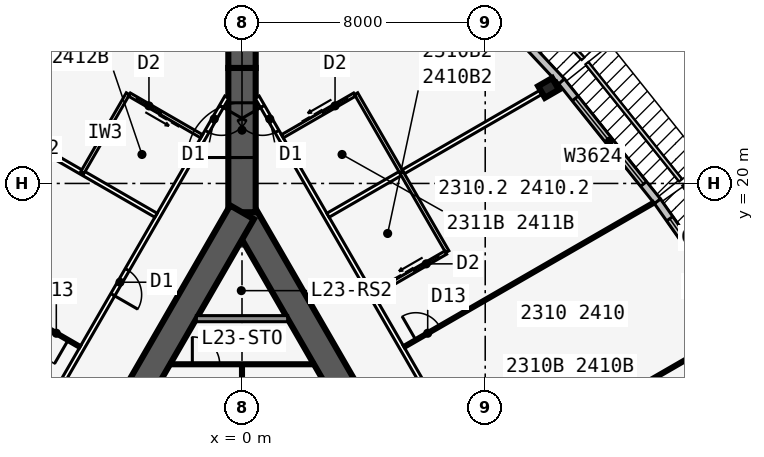
"""IFC4 building model, lengths in metres.
Left out: names, types, materials, properties, quantities, classifications, styles, units other than length and angle.
Written with IfcOpenShell. Run it as: python <this file> out.ifc"""

import sys

from ifc_helpers import new_model, si_unit, direction, frame, frame_2d, origin, origin_2d, place, context, subcontext, project, spatial, rectangle, i_section, extrude, element, fill, save


model = new_model("IFC4")
c1 = context("Model", 3, precision=1e-05, world=origin(), true_north=direction((0.0, 1.0)))
c2 = subcontext(c1, "Body", "Model", "MODEL_VIEW")
j1 = project(units=[si_unit("LENGTHUNIT", "METRE"), si_unit("PLANEANGLEUNIT", "RADIAN")], contexts=[c1])
p1 = place(None, origin())
s1 = spatial("IfcSite", under=j1, at=p1, CompositionType="ELEMENT")
p2 = place(p1, origin())
s2 = spatial("IfcBuilding", under=s1, at=p2, CompositionType="ELEMENT")
p3 = place(p2, frame((0.0, 0.0, 89.7)))
s3 = spatial("IfcBuildingStorey", under=s2, at=p3, CompositionType="ELEMENT", Elevation=89.7)
p4 = place(p3, frame((16.5, -9.526, 0.0), z_axis=(0.0, 0.0, 1.0), x_axis=(-0.499999749417, 0.866025548458, 0.0)))
e1 = element("IfcWall", 1, at=p4, inside=s3, PredefinedType="SHEAR", context=c2, shape_type="SweptSolid", body=[
    extrude(rectangle(XDim=33.0, YDim=0.9, at=frame_2d((16.5, 0.0))), origin(), (0.0, 0.0, 1.0), 3.4),
])
p5 = place(p4, frame((14.15, 0.0, 0.0)))
e2 = element("IfcOpeningElement", 2, at=p5, cuts=e1, PredefinedType="OPENING", context=c2, shape_type="SweptSolid", body=[
    extrude(rectangle(XDim=1.8, YDim=2.13, at=frame_2d((0.9, 1.065))), frame((0.0, 0.46, 0.0), z_axis=(0.0, -1.0, 0.0), x_axis=(1.0, 0.0, 0.0)), (0.0, 0.0, 1.0), 0.92),
])
p6 = place(p4, frame((12.6, 0.0, 0.0)))
e3 = element("IfcOpeningElement", 3, at=p6, cuts=e1, PredefinedType="OPENING", context=c2, shape_type="SweptSolid", body=[
    extrude(rectangle(XDim=1.0, YDim=2.13, at=frame_2d((0.5, 1.065))), frame((0.0, 0.46, 0.0), z_axis=(0.0, -1.0, 0.0), x_axis=(1.0, 0.0, 0.0)), (0.0, 0.0, 1.0), 0.92),
])
p7 = place(p3, frame((0.0, 19.052, 0.0), z_axis=(0.0, 0.0, 1.0), x_axis=(-0.499999749417, -0.866025548458, 0.0)))
e4 = element("IfcWall", 4, at=p7, inside=s3, PredefinedType="SHEAR", context=c2, shape_type="SweptSolid", body=[
    extrude(rectangle(XDim=33.0, YDim=0.9, at=frame_2d((16.5, 0.0))), origin(), (0.0, 0.0, 1.0), 3.4),
])
p8 = place(p7, frame((14.15, 0.0, 0.0)))
e5 = element("IfcOpeningElement", 5, at=p8, cuts=e4, PredefinedType="OPENING", context=c2, shape_type="SweptSolid", body=[
    extrude(rectangle(XDim=1.8, YDim=2.13, at=frame_2d((0.9, 1.065))), frame((0.0, 0.46, 0.0), z_axis=(0.0, -1.0, 0.0), x_axis=(1.0, 0.0, 0.0)), (0.0, 0.0, 1.0), 0.92),
])
p9 = place(p7, frame((12.6, 0.0, 0.0)))
e6 = element("IfcOpeningElement", 6, at=p9, cuts=e4, PredefinedType="OPENING", context=c2, shape_type="SweptSolid", body=[
    extrude(rectangle(XDim=1.0, YDim=2.13, at=frame_2d((0.5, 1.065))), frame((0.0, 0.46, 0.0), z_axis=(0.0, -1.0, 0.0), x_axis=(1.0, 0.0, 0.0)), (0.0, 0.0, 1.0), 0.92),
])
p10 = place(p3, frame((0.0, 19.052, 0.0), z_axis=(0.0, 0.0, 1.0), x_axis=(0.0, 1.0, 0.0)))
e7 = element("IfcWall", 7, at=p10, inside=s3, PredefinedType="SHEAR", context=c2, shape_type="SweptSolid", body=[
    extrude(rectangle(XDim=4.746, YDim=0.9, at=frame_2d((2.373, 0.0))), origin(), (0.0, 0.0, 1.0), 3.4),
])
p11 = place(p10, frame((1.8, 0.0, 0.0)))
e8 = element("IfcOpeningElement", 8, at=p11, cuts=e7, PredefinedType="OPENING", context=c2, shape_type="SweptSolid", body=[
    extrude(rectangle(XDim=1.8, YDim=2.13, at=frame_2d((0.9, 1.065))), frame((0.0, 0.46, 0.0), z_axis=(0.0, -1.0, 0.0), x_axis=(1.0, 0.0, 0.0)), (0.0, 0.0, 1.0), 0.92),
])
p12 = place(p3, frame((0.0, 23.799, 0.0), z_axis=(0.0, 0.0, 1.0), x_axis=(0.0, 1.0, 0.0)))
e9 = element("IfcWall", 9, at=p12, inside=s3, PredefinedType="SHEAR", context=c2, shape_type="SweptSolid", body=[
    extrude(rectangle(XDim=1.155, YDim=0.9, at=frame_2d((0.577, 0.0))), origin(), (0.0, 0.0, 1.0), 3.4),
])
p13 = place(p3, frame((10.083, 23.142, 0.0), z_axis=(0.0, 0.0, 1.0), x_axis=(-0.5, 0.866025403784, 0.0)))
e10 = element("IfcColumn", 10, at=p13, inside=s3, PredefinedType="COLUMN", context=c2, shape_type="SweptSolid", body=[
    extrude(i_section(OverallWidth=0.442, OverallDepth=0.531, WebThickness=0.066, FlangeThickness=0.106, at=origin_2d()), origin(), (0.0, 0.0, 1.0), 3.4),
])
p14 = place(p3, frame((16.555, 15.318, 0.0), z_axis=(0.0, 0.0, 1.0), x_axis=(-0.5766431066, 0.81699616132, 0.0)))
e11 = element("IfcWall", 11, at=p14, inside=s3, PredefinedType="STANDARD", context=c2, shape_type="SweptSolid", body=[
    extrude(rectangle(XDim=5.021, YDim=0.25, at=frame_2d((2.51, 0.0))), origin(), (0.0, 0.0, 1.0), 3.235),
])
p15 = place(p14, frame((0.71, 0.0, 0.45)))
e12 = element("IfcOpeningElement", 12, at=p15, cuts=e11, PredefinedType="OPENING", context=c2, shape_type="SweptSolid", body=[
    extrude(rectangle(XDim=3.6, YDim=2.4, at=frame_2d((1.8, 1.2))), frame((0.0, 0.135, 0.0), z_axis=(0.0, -1.0, 0.0), x_axis=(1.0, 0.0, 0.0)), (0.0, 0.0, 1.0), 0.27),
])
p16 = place(p3, frame((13.664, 19.414, 0.0), z_axis=(0.0, 0.0, 1.0), x_axis=(-0.624594965756, 0.780948864364, 0.0)))
e13 = element("IfcWall", 13, at=p16, inside=s3, PredefinedType="STANDARD", context=c2, shape_type="SweptSolid", body=[
    extrude(rectangle(XDim=5.058, YDim=0.25, at=frame_2d((2.529, 0.0))), origin(), (0.0, 0.0, 1.0), 3.235),
])
p17 = place(p16, frame((0.729, 0.0, 0.45)))
e14 = element("IfcOpeningElement", 14, at=p17, cuts=e13, PredefinedType="OPENING", context=c2, shape_type="SweptSolid", body=[
    extrude(rectangle(XDim=3.6, YDim=2.4, at=frame_2d((1.8, 1.2))), frame((0.0, 0.135, 0.0), z_axis=(0.0, -1.0, 0.0), x_axis=(1.0, 0.0, 0.0)), (0.0, 0.0, 1.0), 0.27),
])
p18 = place(p3, frame((10.511, 23.357, 0.0), z_axis=(0.0, 0.0, 1.0), x_axis=(-0.682289646561, 0.731081964075, 0.0)))
e15 = element("IfcWall", 15, at=p18, inside=s3, PredefinedType="STANDARD", context=c2, shape_type="SweptSolid", body=[
    extrude(rectangle(XDim=8.211, YDim=0.25, at=frame_2d((4.105, 0.0))), origin(), (0.0, 0.0, 1.0), 3.235),
])
p19 = place(p18, frame((2.006, 0.0, 0.45)))
e16 = element("IfcOpeningElement", 16, at=p19, cuts=e15, PredefinedType="OPENING", context=c2, shape_type="SweptSolid", body=[
    extrude(rectangle(XDim=4.2, YDim=2.4, at=frame_2d((2.1, 1.2))), frame((0.0, 0.135, 0.0), z_axis=(0.0, -1.0, 0.0), x_axis=(1.0, 0.0, 0.0)), (0.0, 0.0, 1.0), 0.27),
])
p20 = place(p3, frame((-4.909, 29.36, 0.0), z_axis=(0.0, 0.0, 1.0), x_axis=(-0.682289646561, -0.731081964075, 0.0)))
e17 = element("IfcWall", 17, at=p20, inside=s3, PredefinedType="STANDARD", context=c2, shape_type="SweptSolid", body=[
    extrude(rectangle(XDim=8.211, YDim=0.25, at=frame_2d((4.105, 0.0))), origin(), (0.0, 0.0, 1.0), 3.235),
])
p21 = place(p20, frame((2.006, 0.0, 0.45)))
e18 = element("IfcOpeningElement", 18, at=p21, cuts=e17, PredefinedType="OPENING", context=c2, shape_type="SweptSolid", body=[
    extrude(rectangle(XDim=4.2, YDim=2.4, at=frame_2d((2.1, 1.2))), frame((0.0, 0.135, 0.0), z_axis=(0.0, -1.0, 0.0), x_axis=(1.0, 0.0, 0.0)), (0.0, 0.0, 1.0), 0.27),
])
p22 = place(p3, frame((20.027, -10.985, 0.0), z_axis=(0.0, 0.0, 1.0), x_axis=(-0.500001677587, 0.866024435227, 0.0)))
e19 = element("IfcWall", 19, at=p22, inside=s3, PredefinedType="PARTITIONING", context=c2, shape_type="SweptSolid", body=[
    extrude(rectangle(XDim=39.054, YDim=0.15, at=frame_2d((19.527, 0.0))), origin(), (0.0, 0.0, 1.0), 3.235),
])
p23 = place(p22, frame((0.352, 0.0, 0.0)))
e20 = element("IfcOpeningElement", 20, at=p23, cuts=e19, PredefinedType="OPENING", context=c2, shape_type="SweptSolid", body=[
    extrude(rectangle(XDim=0.95, YDim=2.13, at=frame_2d((0.475, 1.065))), frame((0.0, 0.085, 0.0), z_axis=(0.0, -1.0, 0.0), x_axis=(1.0, 0.0, 0.0)), (0.0, 0.0, 1.0), 0.17),
])
p24 = place(p22, frame((10.352, 0.0, 0.0)))
e21 = element("IfcOpeningElement", 21, at=p24, cuts=e19, PredefinedType="OPENING", context=c2, shape_type="SweptSolid", body=[
    extrude(rectangle(XDim=0.95, YDim=2.13, at=frame_2d((0.475, 1.065))), frame((0.0, 0.085, 0.0), z_axis=(0.0, -1.0, 0.0), x_axis=(1.0, 0.0, 0.0)), (0.0, 0.0, 1.0), 0.17),
])
p25 = place(p22, frame((17.752, 0.0, 0.0)))
e22 = element("IfcOpeningElement", 22, at=p25, cuts=e19, PredefinedType="OPENING", context=c2, shape_type="SweptSolid", body=[
    extrude(rectangle(XDim=0.95, YDim=2.13, at=frame_2d((0.475, 1.065))), frame((0.0, 0.085, 0.0), z_axis=(0.0, -1.0, 0.0), x_axis=(1.0, 0.0, 0.0)), (0.0, 0.0, 1.0), 0.17),
])
p26 = place(p22, frame((26.552, 0.0, 0.0)))
e23 = element("IfcOpeningElement", 23, at=p26, cuts=e19, PredefinedType="OPENING", context=c2, shape_type="SweptSolid", body=[
    extrude(rectangle(XDim=0.95, YDim=2.13, at=frame_2d((0.475, 1.065))), frame((0.0, 0.085, 0.0), z_axis=(0.0, -1.0, 0.0), x_axis=(1.0, 0.0, 0.0)), (0.0, 0.0, 1.0), 0.17),
])
p27 = place(p22, frame((37.752, 0.0, 0.0)))
e24 = element("IfcOpeningElement", 24, at=p27, cuts=e19, PredefinedType="OPENING", context=c2, shape_type="SweptSolid", body=[
    extrude(rectangle(XDim=0.95, YDim=2.13, at=frame_2d((0.475, 1.065))), frame((0.0, 0.085, 0.0), z_axis=(0.0, -1.0, 0.0), x_axis=(1.0, 0.0, 0.0)), (0.0, 0.0, 1.0), 0.17),
])
p28 = place(p3, frame((7.829, 10.293, 0.0), z_axis=(0.0, 0.0, 1.0), x_axis=(0.866016302457, 0.50001576363, 0.0)))
e25 = element("IfcWall", 25, at=p28, inside=s3, PredefinedType="PARTITIONING", context=c2, shape_type="SweptSolid", body=[
    extrude(rectangle(XDim=9.943, YDim=0.1, at=frame_2d((4.972, 0.0))), origin(), (0.0, 0.0, 1.0), 2.389),
])
p29 = place(p28, frame((0.45, 0.0, 0.0)))
e26 = element("IfcOpeningElement", 26, at=p29, cuts=e25, PredefinedType="OPENING", context=c2, shape_type="SweptSolid", body=[
    extrude(rectangle(XDim=0.9, YDim=2.13, at=frame_2d((0.45, 1.065))), frame((0.0, 0.06, 0.0), z_axis=(0.0, -1.0, 0.0), x_axis=(1.0, 0.0, 0.0)), (0.0, 0.0, 1.0), 0.12),
])
p30 = place(p3, frame((5.329, 14.623, 0.0), z_axis=(0.0, 0.0, 1.0), x_axis=(0.866018409083, 0.500012114982, 0.0)))
e27 = element("IfcWall", 27, at=p30, inside=s3, PredefinedType="PARTITIONING", context=c2, shape_type="SweptSolid", body=[
    extrude(rectangle(XDim=9.485, YDim=0.1, at=frame_2d((4.742, 0.0))), origin(), (0.0, 0.0, 1.0), 2.389),
])
p31 = place(p30, frame((0.45, 0.0, 0.0)))
e28 = element("IfcOpeningElement", 28, at=p31, cuts=e27, PredefinedType="OPENING", context=c2, shape_type="SweptSolid", body=[
    extrude(rectangle(XDim=0.9, YDim=2.13, at=frame_2d((0.45, 1.065))), frame((0.0, 0.06, 0.0), z_axis=(0.0, -1.0, 0.0), x_axis=(1.0, 0.0, 0.0)), (0.0, 0.0, 1.0), 0.12),
])
p32 = place(p3, frame((2.829, 18.954, 0.0), z_axis=(0.0, 0.0, 1.0), x_axis=(0.866020536561, 0.500008430184, 0.0)))
e29 = element("IfcWall", 29, at=p32, inside=s3, PredefinedType="PARTITIONING", context=c2, shape_type="SweptSolid", body=[
    extrude(rectangle(XDim=8.72, YDim=0.15, at=frame_2d((4.36, 0.0))), origin(), (0.0, 0.0, 1.0), 2.389),
])
p33 = place(p3, frame((6.753, 17.755, 0.0), z_axis=(0.0, 0.0, 1.0), x_axis=(-0.499990139034, 0.866031096941, 0.0)))
e30 = element("IfcWall", 30, at=p33, inside=s3, PredefinedType="PLUMBINGWALL", context=c2, shape_type="SweptSolid", body=[
    extrude(rectangle(XDim=3.0, YDim=0.12, at=frame_2d((1.5, 0.0))), origin(), (0.0, 0.0, 1.0), 3.235),
])
p34 = place(p3, frame((4.329, 16.355, 0.0), z_axis=(0.0, 0.0, 1.0), x_axis=(0.866035715982, 0.499982138324, 0.0)))
e31 = element("IfcWall", 31, at=p34, inside=s3, PredefinedType="PLUMBINGWALL", context=c2, shape_type="SweptSolid", body=[
    extrude(rectangle(XDim=2.74, YDim=0.12, at=frame_2d((1.37, 0.0))), origin(), (0.0, 0.0, 1.0), 3.235),
])
p35 = place(p34, frame((1.55, 0.0, 0.0)))
e32 = element("IfcOpeningElement", 32, at=p35, cuts=e31, PredefinedType="OPENING", context=c2, shape_type="SweptSolid", body=[
    extrude(rectangle(XDim=0.9, YDim=2.13, at=frame_2d((0.45, 1.065))), frame((0.0, 0.07, 0.0), z_axis=(0.0, -1.0, 0.0), x_axis=(1.0, 0.0, 0.0)), (0.0, 0.0, 1.0), 0.14),
])
p36 = place(p3, frame((5.253, 20.354, 0.0), z_axis=(0.0, 0.0, 1.0), x_axis=(-0.499990139034, 0.866031096941, 0.0)))
e33 = element("IfcWall", 33, at=p36, inside=s3, PredefinedType="PLUMBINGWALL", context=c2, shape_type="SweptSolid", body=[
    extrude(rectangle(XDim=3.0, YDim=0.12, at=frame_2d((1.5, 0.0))), origin(), (0.0, 0.0, 1.0), 3.235),
])
p37 = place(p3, frame((1.329, 21.552, 0.0), z_axis=(0.0, 0.0, 1.0), x_axis=(0.865997131366, 0.500048966069, 0.0)))
e34 = element("IfcWall", 34, at=p37, inside=s3, PredefinedType="PLUMBINGWALL", context=c2, shape_type="SweptSolid", body=[
    extrude(rectangle(XDim=2.74, YDim=0.12, at=frame_2d((1.37, 0.0))), origin(), (0.0, 0.0, 1.0), 3.235),
])
p38 = place(p37, frame((1.55, 0.0, 0.0)))
e35 = element("IfcOpeningElement", 35, at=p38, cuts=e34, PredefinedType="OPENING", context=c2, shape_type="SweptSolid", body=[
    extrude(rectangle(XDim=0.9, YDim=2.13, at=frame_2d((0.45, 1.065))), frame((0.0, 0.07, 0.0), z_axis=(0.0, -1.0, 0.0), x_axis=(1.0, 0.0, 0.0)), (0.0, 0.0, 1.0), 0.14),
])
p39 = place(p3, frame((-0.5, 22.836, 0.0), z_axis=(0.0, 0.0, 1.0), x_axis=(-0.500001677587, -0.866024435227, 0.0)))
e36 = element("IfcWall", 36, at=p39, inside=s3, PredefinedType="PARTITIONING", context=c2, shape_type="SweptSolid", body=[
    extrude(rectangle(XDim=39.054, YDim=0.15, at=frame_2d((19.527, 0.0))), origin(), (0.0, 0.0, 1.0), 3.235),
])
p40 = place(p39, frame((0.352, 0.0, 0.0)))
e37 = element("IfcOpeningElement", 37, at=p40, cuts=e36, PredefinedType="OPENING", context=c2, shape_type="SweptSolid", body=[
    extrude(rectangle(XDim=0.95, YDim=2.13, at=frame_2d((0.475, 1.065))), frame((0.0, 0.085, 0.0), z_axis=(0.0, -1.0, 0.0), x_axis=(1.0, 0.0, 0.0)), (0.0, 0.0, 1.0), 0.17),
])
p41 = place(p39, frame((6.552, 0.0, 0.0)))
e38 = element("IfcOpeningElement", 38, at=p41, cuts=e36, PredefinedType="OPENING", context=c2, shape_type="SweptSolid", body=[
    extrude(rectangle(XDim=0.95, YDim=2.13, at=frame_2d((0.475, 1.065))), frame((0.0, 0.085, 0.0), z_axis=(0.0, -1.0, 0.0), x_axis=(1.0, 0.0, 0.0)), (0.0, 0.0, 1.0), 0.17),
])
p42 = place(p39, frame((20.352, 0.0, 0.0)))
e39 = element("IfcOpeningElement", 39, at=p42, cuts=e36, PredefinedType="OPENING", context=c2, shape_type="SweptSolid", body=[
    extrude(rectangle(XDim=0.95, YDim=2.13, at=frame_2d((0.475, 1.065))), frame((0.0, 0.085, 0.0), z_axis=(0.0, -1.0, 0.0), x_axis=(1.0, 0.0, 0.0)), (0.0, 0.0, 1.0), 0.17),
])
p43 = place(p39, frame((27.752, 0.0, 0.0)))
e40 = element("IfcOpeningElement", 40, at=p43, cuts=e36, PredefinedType="OPENING", context=c2, shape_type="SweptSolid", body=[
    extrude(rectangle(XDim=0.95, YDim=2.13, at=frame_2d((0.475, 1.065))), frame((0.0, 0.085, 0.0), z_axis=(0.0, -1.0, 0.0), x_axis=(1.0, 0.0, 0.0)), (0.0, 0.0, 1.0), 0.17),
])
p44 = place(p39, frame((37.752, 0.0, 0.0)))
e41 = element("IfcOpeningElement", 41, at=p44, cuts=e36, PredefinedType="OPENING", context=c2, shape_type="SweptSolid", body=[
    extrude(rectangle(XDim=0.95, YDim=2.13, at=frame_2d((0.475, 1.065))), frame((0.0, 0.085, 0.0), z_axis=(0.0, -1.0, 0.0), x_axis=(1.0, 0.0, 0.0)), (0.0, 0.0, 1.0), 0.17),
])
p45 = place(p3, frame((-2.829, 18.954, 0.0), z_axis=(0.0, 0.0, 1.0), x_axis=(-0.866020536561, 0.500008430184, 0.0)))
e42 = element("IfcWall", 42, at=p45, inside=s3, PredefinedType="PARTITIONING", context=c2, shape_type="SweptSolid", body=[
    extrude(rectangle(XDim=8.72, YDim=0.15, at=frame_2d((4.36, 0.0))), origin(), (0.0, 0.0, 1.0), 2.389),
])
p46 = place(p3, frame((-5.329, 14.623, 0.0), z_axis=(0.0, 0.0, 1.0), x_axis=(-0.866018409083, 0.500012114982, 0.0)))
e43 = element("IfcWall", 43, at=p46, inside=s3, PredefinedType="PARTITIONING", context=c2, shape_type="SweptSolid", body=[
    extrude(rectangle(XDim=9.485, YDim=0.1, at=frame_2d((4.742, 0.0))), origin(), (0.0, 0.0, 1.0), 2.389),
])
p47 = place(p46, frame((0.45, 0.0, 0.0)))
e44 = element("IfcOpeningElement", 44, at=p47, cuts=e43, PredefinedType="OPENING", context=c2, shape_type="SweptSolid", body=[
    extrude(rectangle(XDim=0.9, YDim=2.13, at=frame_2d((0.45, 1.065))), frame((0.0, 0.06, 0.0), z_axis=(0.0, -1.0, 0.0), x_axis=(1.0, 0.0, 0.0)), (0.0, 0.0, 1.0), 0.12),
])
p48 = place(p3, frame((-3.753, 22.952, 0.0), z_axis=(0.0, 0.0, 1.0), x_axis=(-0.499990139034, -0.866031096941, 0.0)))
e45 = element("IfcWall", 45, at=p48, inside=s3, PredefinedType="PLUMBINGWALL", context=c2, shape_type="SweptSolid", body=[
    extrude(rectangle(XDim=3.0, YDim=0.12, at=frame_2d((1.5, 0.0))), origin(), (0.0, 0.0, 1.0), 3.235),
])
p49 = place(p3, frame((-1.329, 21.552, 0.0), z_axis=(0.0, 0.0, 1.0), x_axis=(-0.865997131366, 0.500048966069, 0.0)))
e46 = element("IfcWall", 46, at=p49, inside=s3, PredefinedType="PLUMBINGWALL", context=c2, shape_type="SweptSolid", body=[
    extrude(rectangle(XDim=2.74, YDim=0.12, at=frame_2d((1.37, 0.0))), origin(), (0.0, 0.0, 1.0), 3.235),
])
p50 = place(p49, frame((1.55, 0.0, 0.0)))
e47 = element("IfcOpeningElement", 47, at=p50, cuts=e46, PredefinedType="OPENING", context=c2, shape_type="SweptSolid", body=[
    extrude(rectangle(XDim=0.9, YDim=2.13, at=frame_2d((0.45, 1.065))), frame((0.0, 0.07, 0.0), z_axis=(0.0, -1.0, 0.0), x_axis=(1.0, 0.0, 0.0)), (0.0, 0.0, 1.0), 0.14),
])
p51 = place(p3, frame((-1.501, 15.552, 0.0), z_axis=(0.0, 0.0, 1.0), x_axis=(1.0, 0.0, 0.0)))
e48 = element("IfcWall", 48, at=p51, inside=s3, PredefinedType="SOLIDWALL", context=c2, shape_type="SweptSolid", body=[
    extrude(rectangle(XDim=3.002, YDim=0.2, at=frame_2d((1.501, 0.0))), origin(), (0.0, 0.0, 1.0), 3.235),
])
p52 = place(p3, frame((-2.367, 14.052, 0.0), z_axis=(0.0, 0.0, 1.0), x_axis=(1.0, 0.0, 0.0)))
e49 = element("IfcWall", 49, at=p52, inside=s3, PredefinedType="PARTITIONING", context=c2, shape_type="SweptSolid", body=[
    extrude(rectangle(XDim=4.734, YDim=0.1, at=frame_2d((2.367, 0.0))), origin(), (0.0, 0.0, 1.0), 3.235),
])
p53 = place(p52, frame((0.734, 0.0, 0.0)))
e50 = element("IfcOpeningElement", 50, at=p53, cuts=e49, PredefinedType="OPENING", context=c2, shape_type="SweptSolid", body=[
    extrude(rectangle(XDim=0.9, YDim=2.13, at=frame_2d((0.45, 1.065))), frame((0.0, 0.06, 0.0), z_axis=(0.0, -1.0, 0.0), x_axis=(1.0, 0.0, 0.0)), (0.0, 0.0, 1.0), 0.12),
])
p54 = place(p3, frame((0.0, 14.052, 0.0), z_axis=(0.0, 0.0, 1.0), x_axis=(0.0, -1.0, 0.0)))
e51 = element("IfcWall", 51, at=p54, inside=s3, PredefinedType="PARTITIONING", context=c2, shape_type="SweptSolid", body=[
    extrude(rectangle(XDim=2.275, YDim=0.1, at=frame_2d((1.138, 0.0))), origin(), (0.0, 0.0, 1.0), 3.235),
])
p55 = place(p54, frame((0.915, 0.0, 0.0)))
e52 = element("IfcOpeningElement", 52, at=p55, cuts=e51, PredefinedType="OPENING", context=c2, shape_type="SweptSolid", body=[
    extrude(rectangle(XDim=0.9, YDim=2.13, at=frame_2d((0.45, 1.065))), frame((0.0, 0.06, 0.0), z_axis=(0.0, -1.0, 0.0), x_axis=(1.0, 0.0, 0.0)), (0.0, 0.0, 1.0), 0.12),
])
p56 = place(p15, origin())
e53 = element("IfcWindow", 53, at=p56, inside=s3, PartitioningType="SINGLE_PANEL", PredefinedType="WINDOW", context=c2, shape_type="SweptSolid", body=[
    extrude(rectangle(XDim=3.6, YDim=2.4, at=frame_2d((1.8, 1.2))), frame((0.0, 0.03, 0.0), z_axis=(0.0, -1.0, 0.0), x_axis=(1.0, 0.0, 0.0)), (0.0, 0.0, 1.0), 0.06),
])
fill(e12, e53)
p57 = place(p17, origin())
e54 = element("IfcWindow", 54, at=p57, inside=s3, PartitioningType="SINGLE_PANEL", PredefinedType="WINDOW", context=c2, shape_type="SweptSolid", body=[
    extrude(rectangle(XDim=3.6, YDim=2.4, at=frame_2d((1.8, 1.2))), frame((0.0, 0.03, 0.0), z_axis=(0.0, -1.0, 0.0), x_axis=(1.0, 0.0, 0.0)), (0.0, 0.0, 1.0), 0.06),
])
fill(e14, e54)
p58 = place(p31, origin())
e55 = element("IfcDoor", 55, at=p58, inside=s3, OperationType="SINGLE_SWING_LEFT", PredefinedType="DOOR", context=c2, shape_type="SweptSolid", body=[
    extrude(rectangle(XDim=0.9, YDim=2.13, at=frame_2d((0.45, 1.065))), frame((0.0, 0.025, 0.0), z_axis=(0.0, -1.0, 0.0), x_axis=(1.0, 0.0, 0.0)), (0.0, 0.0, 1.0), 0.05),
])
fill(e28, e55)
p59 = place(p35, origin())
e56 = element("IfcDoor", 56, at=p59, inside=s3, OperationType="SLIDING_TO_LEFT", PredefinedType="DOOR", context=c2, shape_type="SweptSolid", body=[
    extrude(rectangle(XDim=0.9, YDim=2.13, at=frame_2d((0.45, 1.065))), frame((0.0, 0.025, 0.0), z_axis=(0.0, -1.0, 0.0), x_axis=(1.0, 0.0, 0.0)), (0.0, 0.0, 1.0), 0.05),
])
fill(e32, e56)
p60 = place(p38, origin())
e57 = element("IfcDoor", 57, at=p60, inside=s3, OperationType="SLIDING_TO_LEFT", PredefinedType="DOOR", context=c2, shape_type="SweptSolid", body=[
    extrude(rectangle(XDim=0.9, YDim=2.13, at=frame_2d((0.45, 1.065))), frame((0.0, 0.025, 0.0), z_axis=(0.0, -1.0, 0.0), x_axis=(1.0, 0.0, 0.0)), (0.0, 0.0, 1.0), 0.05),
])
fill(e35, e57)
p61 = place(p27, origin())
e58 = element("IfcDoor", 58, at=p61, inside=s3, OperationType="SINGLE_SWING_RIGHT", PredefinedType="DOOR", context=c2, shape_type="SweptSolid", body=[
    extrude(rectangle(XDim=0.95, YDim=2.13, at=frame_2d((0.475, 1.065))), frame((0.0, 0.025, 0.0), z_axis=(0.0, -1.0, 0.0), x_axis=(1.0, 0.0, 0.0)), (0.0, 0.0, 1.0), 0.05),
])
fill(e24, e58)
p62 = place(p47, origin())
e59 = element("IfcDoor", 59, at=p62, inside=s3, OperationType="SINGLE_SWING_LEFT", PredefinedType="DOOR", context=c2, shape_type="SweptSolid", body=[
    extrude(rectangle(XDim=0.9, YDim=2.13, at=frame_2d((0.45, 1.065))), frame((0.0, 0.025, 0.0), z_axis=(0.0, -1.0, 0.0), x_axis=(1.0, 0.0, 0.0)), (0.0, 0.0, 1.0), 0.05),
])
fill(e44, e59)
p63 = place(p50, origin())
e60 = element("IfcDoor", 60, at=p63, inside=s3, OperationType="SLIDING_TO_LEFT", PredefinedType="DOOR", context=c2, shape_type="SweptSolid", body=[
    extrude(rectangle(XDim=0.9, YDim=2.13, at=frame_2d((0.45, 1.065))), frame((0.0, 0.025, 0.0), z_axis=(0.0, -1.0, 0.0), x_axis=(1.0, 0.0, 0.0)), (0.0, 0.0, 1.0), 0.05),
])
fill(e47, e60)
p64 = place(p40, origin())
e61 = element("IfcDoor", 61, at=p64, inside=s3, OperationType="SINGLE_SWING_LEFT", PredefinedType="DOOR", context=c2, shape_type="SweptSolid", body=[
    extrude(rectangle(XDim=0.95, YDim=2.13, at=frame_2d((0.475, 1.065))), frame((0.0, 0.025, 0.0), z_axis=(0.0, -1.0, 0.0), x_axis=(1.0, 0.0, 0.0)), (0.0, 0.0, 1.0), 0.05),
])
fill(e37, e61)
p65 = place(p41, origin())
e62 = element("IfcDoor", 62, at=p65, inside=s3, OperationType="SINGLE_SWING_RIGHT", PredefinedType="DOOR", context=c2, shape_type="SweptSolid", body=[
    extrude(rectangle(XDim=0.95, YDim=2.13, at=frame_2d((0.475, 1.065))), frame((0.0, 0.025, 0.0), z_axis=(0.0, -1.0, 0.0), x_axis=(1.0, 0.0, 0.0)), (0.0, 0.0, 1.0), 0.05),
])
fill(e38, e62)
p66 = place(p11, origin())
e63 = element("IfcDoor", 63, at=p66, inside=s3, OperationType="DOUBLE_DOOR_DOUBLE_SWING", PredefinedType="DOOR", context=c2, shape_type="SweptSolid", body=[
    extrude(rectangle(XDim=1.8, YDim=2.13, at=frame_2d((0.9, 1.065))), frame((0.0, 0.025, 0.0), z_axis=(0.0, -1.0, 0.0), x_axis=(1.0, 0.0, 0.0)), (0.0, 0.0, 1.0), 0.05),
])
fill(e8, e63)
p67 = place(p53, origin())
e64 = element("IfcDoor", 64, at=p67, inside=s3, OperationType="SINGLE_SWING_LEFT", PredefinedType="DOOR", context=c2, shape_type="SweptSolid", body=[
    extrude(rectangle(XDim=0.9, YDim=2.13, at=frame_2d((0.45, 1.065))), frame((0.0, 0.025, 0.0), z_axis=(0.0, -1.0, 0.0), x_axis=(1.0, 0.0, 0.0)), (0.0, 0.0, 1.0), 0.05),
])
fill(e50, e64)
save(model, sys.argv[1])
